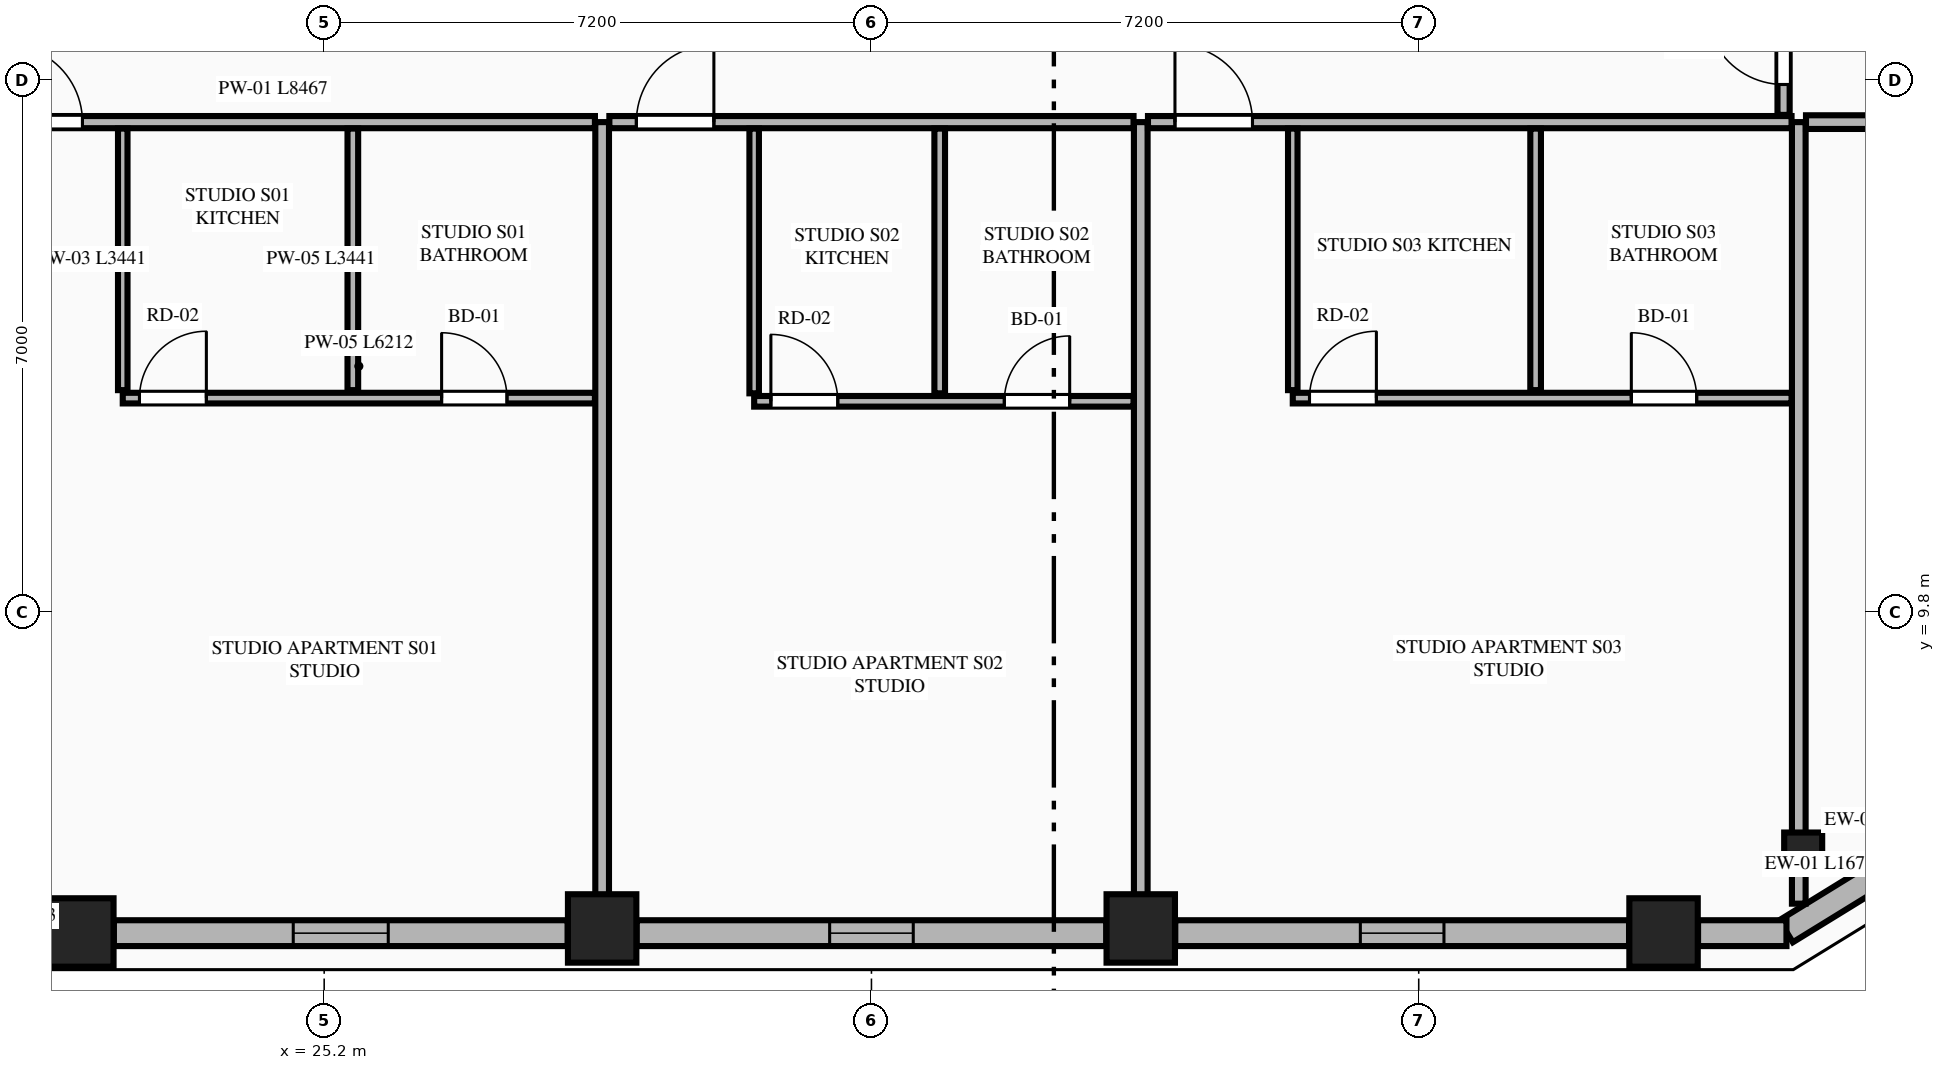
"""IFC4 building model, lengths in metres.
Left out: names, types, materials, properties, quantities, classifications, styles, units other than length and angle.
Written with IfcOpenShell. Run it as: python <this file> out.ifc"""

import sys

from ifc_helpers import new_model, si_unit, direction, frame, frame_2d, origin, origin_2d, place, context, subcontext, project, spatial, rectangle, extrude, element, fill, save


model = new_model("IFC4")
c1 = context("Model", 3, precision=1e-05, world=origin(), true_north=direction((0.0, 1.0)))
c2 = subcontext(c1, "Body", "Model", "MODEL_VIEW")
j1 = project(units=[si_unit("LENGTHUNIT", "METRE"), si_unit("PLANEANGLEUNIT", "RADIAN")], contexts=[c1])
p1 = place(None, origin())
s1 = spatial("IfcSite", under=j1, at=p1, CompositionType="ELEMENT")
p2 = place(p1, origin())
s2 = spatial("IfcBuilding", under=s1, at=p2, CompositionType="ELEMENT")
p3 = place(p2, frame((0.0, 0.0, 189.65)))
s3 = spatial("IfcBuildingStorey", under=s2, at=p3, CompositionType="ELEMENT", Elevation=189.65)
for number, where, z_axis, x_axis in (
    (1, (21.979, 5.589, 0.0), (0.0, 0.0, 1.0), (1.0, 0.0, 0.0)),
    (2, (28.857, 5.642, 0.0), (0.0, 0.0, 1.0), (1.0, 0.0, 0.0)),
    (3, (35.943, 5.642, 0.0), (0.0, 0.0, 1.0), (1.0, 0.0, 0.0)),
    (4, (42.821, 5.589, 0.0), (0.0, 0.0, 1.0), (1.0, 0.0, 0.0)),
):
    element("IfcColumn", number, at=place(p3, frame(where, z_axis=z_axis, x_axis=x_axis)), inside=s3, PredefinedType="COLUMN", context=c2, shape_type="SweptSolid", body=[
        extrude(rectangle(XDim=0.9, YDim=0.9, at=origin_2d()), origin(), (0.0, 0.0, 1.0), 3.55),
    ])
p4 = place(p3, frame((44.658, 6.654, 0.0), z_axis=(0.0, 0.0, 1.0), x_axis=(0.865230187018, 0.501374833306, 0.0)))
e5 = element("IfcColumn", 5, at=p4, inside=s3, PredefinedType="PILASTER", context=c2, shape_type="SweptSolid", body=[
    extrude(rectangle(XDim=0.5, YDim=0.35, at=origin_2d()), origin(), (0.0, 0.0, 1.0), 3.55),
])
p5 = place(p3, frame((44.433, 5.605, 0.0), z_axis=(0.0, 0.0, 1.0), x_axis=(0.851778214877, 0.523902541185, 0.0)))
e6 = element("IfcWall", 6, at=p5, inside=s3, PredefinedType="STANDARD", context=c2, shape_type="SweptSolid", body=[
    extrude(rectangle(XDim=1.678, YDim=0.34, at=frame_2d((0.839, 0.0))), origin(), (0.0, 0.0, 1.0), 3.35),
])
p6 = place(p3, frame((22.433, 5.58, 0.0), z_axis=(0.0, 0.0, 1.0), x_axis=(1.0, 0.0, 0.0)))
e7 = element("IfcWall", 7, at=p6, inside=s3, PredefinedType="STANDARD", context=c2, shape_type="SweptSolid", body=[
    extrude(rectangle(XDim=5.97, YDim=0.34, at=frame_2d((2.985, 0.0))), origin(), (0.0, 0.0, 1.0), 2.883),
])
p7 = place(p6, frame((2.36, 0.0, 0.75)))
e8 = element("IfcOpeningElement", 8, at=p7, cuts=e7, PredefinedType="OPENING", context=c2, shape_type="SweptSolid", body=[
    extrude(rectangle(XDim=1.25, YDim=1.95, at=frame_2d((0.625, 0.975))), frame((0.0, 0.18, 0.0), z_axis=(0.0, -1.0, 0.0), x_axis=(1.0, 0.0, 0.0)), (0.0, 0.0, 1.0), 0.36),
])
p8 = place(p3, frame((29.311, 5.58, 0.0), z_axis=(0.0, 0.0, 1.0), x_axis=(1.0, 0.0, 0.0)))
e9 = element("IfcWall", 9, at=p8, inside=s3, PredefinedType="STANDARD", context=c2, shape_type="SweptSolid", body=[
    extrude(rectangle(XDim=6.178, YDim=0.34, at=frame_2d((3.089, 0.0))), origin(), (0.0, 0.0, 1.0), 2.883),
])
p9 = place(p8, frame((2.539, 0.0, 0.75)))
e10 = element("IfcOpeningElement", 10, at=p9, cuts=e9, PredefinedType="OPENING", context=c2, shape_type="SweptSolid", body=[
    extrude(rectangle(XDim=1.1, YDim=1.983, at=frame_2d((0.55, 0.991))), frame((0.0, 0.18, 0.0), z_axis=(0.0, -1.0, 0.0), x_axis=(1.0, 0.0, 0.0)), (0.0, 0.0, 1.0), 0.36),
])
p10 = place(p3, frame((36.397, 5.58, 0.0), z_axis=(0.0, 0.0, 1.0), x_axis=(1.0, 0.0, 0.0)))
e11 = element("IfcWall", 11, at=p10, inside=s3, PredefinedType="STANDARD", context=c2, shape_type="SweptSolid", body=[
    extrude(rectangle(XDim=5.97, YDim=0.34, at=frame_2d((2.985, 0.0))), origin(), (0.0, 0.0, 1.0), 2.883),
])
p11 = place(p10, frame((2.435, 0.0, 0.75)))
e12 = element("IfcOpeningElement", 12, at=p11, cuts=e11, PredefinedType="OPENING", context=c2, shape_type="SweptSolid", body=[
    extrude(rectangle(XDim=1.1, YDim=1.983, at=frame_2d((0.55, 0.991))), frame((0.0, 0.18, 0.0), z_axis=(0.0, -1.0, 0.0), x_axis=(1.0, 0.0, 0.0)), (0.0, 0.0, 1.0), 0.36),
])
p12 = place(p3, frame((43.275, 5.58, 0.0), z_axis=(0.0, 0.0, 1.0), x_axis=(1.0, 0.0, 0.0)))
e13 = element("IfcWall", 13, at=p12, inside=s3, PredefinedType="STANDARD", context=c2, shape_type="SweptSolid", body=[
    extrude(rectangle(XDim=1.163, YDim=0.34, at=frame_2d((0.582, 0.0))), origin(), (0.0, 0.0, 1.0), 3.35),
])
for number, where, z_axis, x_axis in (
    (14, (28.857, 5.755, 0.0), (0.0, 0.0, 1.0), (0.0, 1.0, 0.0)),
    (15, (35.943, 5.755, 0.0), (0.0, 0.0, 1.0), (0.0, 1.0, 0.0)),
):
    element("IfcWall", number, at=place(p3, frame(where, z_axis=z_axis, x_axis=x_axis)), inside=s3, PredefinedType="PARTITIONING", context=c2, shape_type="SweptSolid", body=[
        extrude(rectangle(XDim=10.495, YDim=0.18, at=frame_2d((5.248, 0.0))), origin(), (0.0, 0.0, 1.0), 2.807),
    ])
p13 = place(p3, frame((44.6, 5.968, 0.0), z_axis=(0.0, 0.0, 1.0), x_axis=(0.0, 1.0, 0.0)))
e16 = element("IfcWall", 16, at=p13, inside=s3, PredefinedType="PARTITIONING", context=c2, shape_type="SweptSolid", body=[
    extrude(rectangle(XDim=10.282, YDim=0.18, at=frame_2d((5.141, 0.0))), origin(), (0.0, 0.0, 1.0), 3.35),
])
p14 = place(p3, frame((20.295, 16.25, 0.0), z_axis=(0.0, 0.0, 1.0), x_axis=(1.0, 0.0, 0.0)))
e17 = element("IfcWall", 17, at=p14, inside=s3, PredefinedType="PARTITIONING", context=c2, shape_type="SweptSolid", body=[
    extrude(rectangle(XDim=8.467, YDim=0.16, at=frame_2d((4.233, 0.0))), origin(), (0.0, 0.0, 1.0), 3.35),
])
p15 = place(p14, frame((0.705, 0.0, 0.0)))
e18 = element("IfcOpeningElement", 18, at=p15, cuts=e17, PredefinedType="OPENING", context=c2, shape_type="SweptSolid", body=[
    extrude(rectangle(XDim=1.02, YDim=2.25, at=frame_2d((0.51, 1.125))), frame((0.0, 0.09, 0.0), z_axis=(0.0, -1.0, 0.0), x_axis=(1.0, 0.0, 0.0)), (0.0, 0.0, 1.0), 0.18),
])
p16 = place(p3, frame((22.55, 12.724, 0.0), z_axis=(0.0, 0.0, 1.0), x_axis=(0.0, 1.0, 0.0)))
e19 = element("IfcWall", 19, at=p16, inside=s3, PredefinedType="PARTITIONING", context=c2, shape_type="SweptSolid", body=[
    extrude(rectangle(XDim=3.441, YDim=0.125, at=frame_2d((1.72, 0.0))), origin(), (0.0, 0.0, 1.0), 2.807),
])
p17 = place(p3, frame((22.55, 12.619, 0.0), z_axis=(0.0, 0.0, 1.0), x_axis=(1.0, 0.0, 0.0)))
e20 = element("IfcWall", 20, at=p17, inside=s3, PredefinedType="PLUMBINGWALL", context=c2, shape_type="SweptSolid", body=[
    extrude(rectangle(XDim=6.212, YDim=0.14, at=frame_2d((3.106, 0.0))), origin(), (0.0, 0.0, 1.0), 3.35),
])
p18 = place(p17, frame((4.195, 0.0, 0.0)))
e21 = element("IfcOpeningElement", 21, at=p18, cuts=e20, PredefinedType="OPENING", context=c2, shape_type="SweptSolid", body=[
    extrude(rectangle(XDim=0.86, YDim=2.1, at=frame_2d((0.43, 1.05))), frame((0.0, 0.08, 0.0), z_axis=(0.0, -1.0, 0.0), x_axis=(1.0, 0.0, 0.0)), (0.0, 0.0, 1.0), 0.16),
])
p19 = place(p17, frame((0.22, 0.0, 0.0)))
e22 = element("IfcOpeningElement", 22, at=p19, cuts=e20, PredefinedType="OPENING", context=c2, shape_type="SweptSolid", body=[
    extrude(rectangle(XDim=0.88, YDim=2.15, at=frame_2d((0.44, 1.075))), frame((0.0, 0.08, 0.0), z_axis=(0.0, -1.0, 0.0), x_axis=(1.0, 0.0, 0.0)), (0.0, 0.0, 1.0), 0.16),
])
p20 = place(p3, frame((25.577, 12.724, 0.0), z_axis=(0.0, 0.0, 1.0), x_axis=(0.0, 1.0, 0.0)))
e23 = element("IfcWall", 23, at=p20, inside=s3, PredefinedType="PLUMBINGWALL", context=c2, shape_type="SweptSolid", body=[
    extrude(rectangle(XDim=3.441, YDim=0.14, at=frame_2d((1.72, 0.0))), origin(), (0.0, 0.0, 1.0), 3.35),
])
p21 = place(p3, frame((28.952, 16.25, 0.0), z_axis=(0.0, 0.0, 1.0), x_axis=(1.0, 0.0, 0.0)))
e24 = element("IfcWall", 24, at=p21, inside=s3, PredefinedType="PARTITIONING", context=c2, shape_type="SweptSolid", body=[
    extrude(rectangle(XDim=6.896, YDim=0.16, at=frame_2d((3.448, 0.0))), origin(), (0.0, 0.0, 1.0), 3.35),
])
p22 = place(p21, frame((0.355, 0.0, 0.0)))
e25 = element("IfcOpeningElement", 25, at=p22, cuts=e24, PredefinedType="OPENING", context=c2, shape_type="SweptSolid", body=[
    extrude(rectangle(XDim=1.02, YDim=2.25, at=frame_2d((0.51, 1.125))), frame((0.0, 0.09, 0.0), z_axis=(0.0, -1.0, 0.0), x_axis=(1.0, 0.0, 0.0)), (0.0, 0.0, 1.0), 0.18),
])
p23 = place(p3, frame((30.857, 12.682, 0.0), z_axis=(0.0, 0.0, 1.0), x_axis=(0.0, 1.0, 0.0)))
e26 = element("IfcWall", 26, at=p23, inside=s3, PredefinedType="PARTITIONING", context=c2, shape_type="SweptSolid", body=[
    extrude(rectangle(XDim=3.483, YDim=0.125, at=frame_2d((1.742, 0.0))), origin(), (0.0, 0.0, 1.0), 3.35),
])
p24 = place(p3, frame((30.857, 12.577, 0.0), z_axis=(0.0, 0.0, 1.0), x_axis=(1.0, 0.0, 0.0)))
e27 = element("IfcWall", 27, at=p24, inside=s3, PredefinedType="PLUMBINGWALL", context=c2, shape_type="SweptSolid", body=[
    extrude(rectangle(XDim=4.991, YDim=0.14, at=frame_2d((2.496, 0.0))), origin(), (0.0, 0.0, 1.0), 3.35),
])
p25 = place(p24, frame((3.291, 0.0, 0.0)))
e28 = element("IfcOpeningElement", 28, at=p25, cuts=e27, PredefinedType="OPENING", context=c2, shape_type="SweptSolid", body=[
    extrude(rectangle(XDim=0.86, YDim=2.1, at=frame_2d((0.43, 1.05))), frame((0.0, 0.08, 0.0), z_axis=(0.0, -1.0, 0.0), x_axis=(1.0, 0.0, 0.0)), (0.0, 0.0, 1.0), 0.16),
])
p26 = place(p24, frame((0.22, 0.0, 0.0)))
e29 = element("IfcOpeningElement", 29, at=p26, cuts=e27, PredefinedType="OPENING", context=c2, shape_type="SweptSolid", body=[
    extrude(rectangle(XDim=0.88, YDim=2.15, at=frame_2d((0.44, 1.075))), frame((0.0, 0.08, 0.0), z_axis=(0.0, -1.0, 0.0), x_axis=(1.0, 0.0, 0.0)), (0.0, 0.0, 1.0), 0.16),
])
p27 = place(p3, frame((33.298, 12.682, 0.0), z_axis=(0.0, 0.0, 1.0), x_axis=(0.0, 1.0, 0.0)))
e30 = element("IfcWall", 30, at=p27, inside=s3, PredefinedType="PLUMBINGWALL", context=c2, shape_type="SweptSolid", body=[
    extrude(rectangle(XDim=3.483, YDim=0.14, at=frame_2d((1.742, 0.0))), origin(), (0.0, 0.0, 1.0), 3.35),
])
p28 = place(p3, frame((36.038, 16.25, 0.0), z_axis=(0.0, 0.0, 1.0), x_axis=(1.0, 0.0, 0.0)))
e31 = element("IfcWall", 31, at=p28, inside=s3, PredefinedType="PARTITIONING", context=c2, shape_type="SweptSolid", body=[
    extrude(rectangle(XDim=8.467, YDim=0.16, at=frame_2d((4.233, 0.0))), origin(), (0.0, 0.0, 1.0), 3.35),
])
p29 = place(p28, frame((0.355, 0.0, 0.0)))
e32 = element("IfcOpeningElement", 32, at=p29, cuts=e31, PredefinedType="OPENING", context=c2, shape_type="SweptSolid", body=[
    extrude(rectangle(XDim=1.02, YDim=2.25, at=frame_2d((0.51, 1.125))), frame((0.0, 0.09, 0.0), z_axis=(0.0, -1.0, 0.0), x_axis=(1.0, 0.0, 0.0)), (0.0, 0.0, 1.0), 0.18),
])
p30 = place(p3, frame((37.943, 12.724, 0.0), z_axis=(0.0, 0.0, 1.0), x_axis=(0.0, 1.0, 0.0)))
e33 = element("IfcWall", 33, at=p30, inside=s3, PredefinedType="PARTITIONING", context=c2, shape_type="SweptSolid", body=[
    extrude(rectangle(XDim=3.441, YDim=0.125, at=frame_2d((1.72, 0.0))), origin(), (0.0, 0.0, 1.0), 3.35),
])
p31 = place(p3, frame((37.943, 12.619, 0.0), z_axis=(0.0, 0.0, 1.0), x_axis=(1.0, 0.0, 0.0)))
e34 = element("IfcWall", 34, at=p31, inside=s3, PredefinedType="PLUMBINGWALL", context=c2, shape_type="SweptSolid", body=[
    extrude(rectangle(XDim=6.562, YDim=0.14, at=frame_2d((3.281, 0.0))), origin(), (0.0, 0.0, 1.0), 3.35),
])
p32 = place(p31, frame((4.454, 0.0, 0.0)))
e35 = element("IfcOpeningElement", 35, at=p32, cuts=e34, PredefinedType="OPENING", context=c2, shape_type="SweptSolid", body=[
    extrude(rectangle(XDim=0.86, YDim=2.1, at=frame_2d((0.43, 1.05))), frame((0.0, 0.08, 0.0), z_axis=(0.0, -1.0, 0.0), x_axis=(1.0, 0.0, 0.0)), (0.0, 0.0, 1.0), 0.16),
])
p33 = place(p31, frame((0.22, 0.0, 0.0)))
e36 = element("IfcOpeningElement", 36, at=p33, cuts=e34, PredefinedType="OPENING", context=c2, shape_type="SweptSolid", body=[
    extrude(rectangle(XDim=0.88, YDim=2.15, at=frame_2d((0.44, 1.075))), frame((0.0, 0.08, 0.0), z_axis=(0.0, -1.0, 0.0), x_axis=(1.0, 0.0, 0.0)), (0.0, 0.0, 1.0), 0.16),
])
p34 = place(p3, frame((41.138, 12.724, 0.0), z_axis=(0.0, 0.0, 1.0), x_axis=(0.0, 1.0, 0.0)))
e37 = element("IfcWall", 37, at=p34, inside=s3, PredefinedType="PLUMBINGWALL", context=c2, shape_type="SweptSolid", body=[
    extrude(rectangle(XDim=3.441, YDim=0.14, at=frame_2d((1.72, 0.0))), origin(), (0.0, 0.0, 1.0), 3.35),
])
p35 = place(p3, frame((44.695, 16.25, 0.0), z_axis=(0.0, 0.0, 1.0), x_axis=(1.0, 0.0, 0.0)))
e38 = element("IfcWall", 38, at=p35, inside=s3, PredefinedType="PARTITIONING", context=c2, shape_type="SweptSolid", body=[
    extrude(rectangle(XDim=5.894, YDim=0.18, at=frame_2d((2.947, 0.0))), origin(), (0.0, 0.0, 1.0), 3.35),
])
p36 = place(p3, frame((44.4, 16.345, 0.0), z_axis=(0.0, 0.0, 1.0), x_axis=(0.0, 1.0, 0.0)))
e39 = element("IfcWall", 39, at=p36, inside=s3, PredefinedType="PARTITIONING", context=c2, shape_type="SweptSolid", body=[
    extrude(rectangle(XDim=6.236, YDim=0.16, at=frame_2d((3.118, 0.0))), origin(), (0.0, 0.0, 1.0), 3.35),
])
p37 = place(p36, frame((0.4, 0.0, 0.0)))
e40 = element("IfcOpeningElement", 40, at=p37, cuts=e39, PredefinedType="OPENING", context=c2, shape_type="SweptSolid", body=[
    extrude(rectangle(XDim=1.02, YDim=2.25, at=frame_2d((0.51, 1.125))), frame((0.0, 0.09, 0.0), z_axis=(0.0, -1.0, 0.0), x_axis=(1.0, 0.0, 0.0)), (0.0, 0.0, 1.0), 0.18),
])
p38 = place(p7, origin())
e41 = element("IfcWindow", 41, at=p38, inside=s3, PartitioningType="SINGLE_PANEL", PredefinedType="WINDOW", context=c2, shape_type="SweptSolid", body=[
    extrude(rectangle(XDim=1.25, YDim=1.95, at=frame_2d((0.625, 0.975))), frame((0.0, 0.03, 0.0), z_axis=(0.0, -1.0, 0.0), x_axis=(1.0, 0.0, 0.0)), (0.0, 0.0, 1.0), 0.06),
])
fill(e8, e41)
p39 = place(p9, origin())
e42 = element("IfcWindow", 42, at=p39, inside=s3, PartitioningType="SINGLE_PANEL", PredefinedType="WINDOW", context=c2, shape_type="SweptSolid", body=[
    extrude(rectangle(XDim=1.1, YDim=1.983, at=frame_2d((0.55, 0.991))), frame((0.0, 0.03, 0.0), z_axis=(0.0, -1.0, 0.0), x_axis=(1.0, 0.0, 0.0)), (0.0, 0.0, 1.0), 0.06),
])
fill(e10, e42)
p40 = place(p11, origin())
e43 = element("IfcWindow", 43, at=p40, inside=s3, PartitioningType="SINGLE_PANEL", PredefinedType="WINDOW", context=c2, shape_type="SweptSolid", body=[
    extrude(rectangle(XDim=1.1, YDim=1.983, at=frame_2d((0.55, 0.991))), frame((0.0, 0.03, 0.0), z_axis=(0.0, -1.0, 0.0), x_axis=(1.0, 0.0, 0.0)), (0.0, 0.0, 1.0), 0.06),
])
fill(e12, e43)
p41 = place(p18, origin())
e44 = element("IfcDoor", 44, at=p41, inside=s3, OperationType="SINGLE_SWING_LEFT", PredefinedType="DOOR", context=c2, shape_type="SweptSolid", body=[
    extrude(rectangle(XDim=0.86, YDim=2.1, at=frame_2d((0.43, 1.05))), frame((0.0, 0.025, 0.0), z_axis=(0.0, -1.0, 0.0), x_axis=(1.0, 0.0, 0.0)), (0.0, 0.0, 1.0), 0.05),
])
fill(e21, e44)
p42 = place(p15, origin())
e45 = element("IfcDoor", 45, at=p42, inside=s3, OperationType="SINGLE_SWING_LEFT", PredefinedType="DOOR", context=c2, shape_type="SweptSolid", body=[
    extrude(rectangle(XDim=1.02, YDim=2.25, at=frame_2d((0.51, 1.125))), frame((0.0, 0.025, 0.0), z_axis=(0.0, -1.0, 0.0), x_axis=(1.0, 0.0, 0.0)), (0.0, 0.0, 1.0), 0.05),
])
fill(e18, e45)
p43 = place(p19, origin())
e46 = element("IfcDoor", 46, at=p43, inside=s3, OperationType="SINGLE_SWING_RIGHT", PredefinedType="DOOR", context=c2, shape_type="SweptSolid", body=[
    extrude(rectangle(XDim=0.88, YDim=2.15, at=frame_2d((0.44, 1.075))), frame((0.0, 0.025, 0.0), z_axis=(0.0, -1.0, 0.0), x_axis=(1.0, 0.0, 0.0)), (0.0, 0.0, 1.0), 0.05),
])
fill(e22, e46)
p44 = place(p25, origin())
e47 = element("IfcDoor", 47, at=p44, inside=s3, OperationType="SINGLE_SWING_RIGHT", PredefinedType="DOOR", context=c2, shape_type="SweptSolid", body=[
    extrude(rectangle(XDim=0.86, YDim=2.1, at=frame_2d((0.43, 1.05))), frame((0.0, 0.025, 0.0), z_axis=(0.0, -1.0, 0.0), x_axis=(1.0, 0.0, 0.0)), (0.0, 0.0, 1.0), 0.05),
])
fill(e28, e47)
p45 = place(p22, origin())
e48 = element("IfcDoor", 48, at=p45, inside=s3, OperationType="SINGLE_SWING_RIGHT", PredefinedType="DOOR", context=c2, shape_type="SweptSolid", body=[
    extrude(rectangle(XDim=1.02, YDim=2.25, at=frame_2d((0.51, 1.125))), frame((0.0, 0.025, 0.0), z_axis=(0.0, -1.0, 0.0), x_axis=(1.0, 0.0, 0.0)), (0.0, 0.0, 1.0), 0.05),
])
fill(e25, e48)
p46 = place(p26, origin())
e49 = element("IfcDoor", 49, at=p46, inside=s3, OperationType="SINGLE_SWING_LEFT", PredefinedType="DOOR", context=c2, shape_type="SweptSolid", body=[
    extrude(rectangle(XDim=0.88, YDim=2.15, at=frame_2d((0.44, 1.075))), frame((0.0, 0.025, 0.0), z_axis=(0.0, -1.0, 0.0), x_axis=(1.0, 0.0, 0.0)), (0.0, 0.0, 1.0), 0.05),
])
fill(e29, e49)
p47 = place(p32, origin())
e50 = element("IfcDoor", 50, at=p47, inside=s3, OperationType="SINGLE_SWING_LEFT", PredefinedType="DOOR", context=c2, shape_type="SweptSolid", body=[
    extrude(rectangle(XDim=0.86, YDim=2.1, at=frame_2d((0.43, 1.05))), frame((0.0, 0.025, 0.0), z_axis=(0.0, -1.0, 0.0), x_axis=(1.0, 0.0, 0.0)), (0.0, 0.0, 1.0), 0.05),
])
fill(e35, e50)
p48 = place(p29, origin())
e51 = element("IfcDoor", 51, at=p48, inside=s3, OperationType="SINGLE_SWING_LEFT", PredefinedType="DOOR", context=c2, shape_type="SweptSolid", body=[
    extrude(rectangle(XDim=1.02, YDim=2.25, at=frame_2d((0.51, 1.125))), frame((0.0, 0.025, 0.0), z_axis=(0.0, -1.0, 0.0), x_axis=(1.0, 0.0, 0.0)), (0.0, 0.0, 1.0), 0.05),
])
fill(e32, e51)
p49 = place(p33, origin())
e52 = element("IfcDoor", 52, at=p49, inside=s3, OperationType="SINGLE_SWING_RIGHT", PredefinedType="DOOR", context=c2, shape_type="SweptSolid", body=[
    extrude(rectangle(XDim=0.88, YDim=2.15, at=frame_2d((0.44, 1.075))), frame((0.0, 0.025, 0.0), z_axis=(0.0, -1.0, 0.0), x_axis=(1.0, 0.0, 0.0)), (0.0, 0.0, 1.0), 0.05),
])
fill(e36, e52)
p50 = place(p37, origin())
e53 = element("IfcDoor", 53, at=p50, inside=s3, OperationType="SINGLE_SWING_RIGHT", PredefinedType="DOOR", context=c2, shape_type="SweptSolid", body=[
    extrude(rectangle(XDim=1.02, YDim=2.25, at=frame_2d((0.51, 1.125))), frame((0.0, 0.025, 0.0), z_axis=(0.0, -1.0, 0.0), x_axis=(1.0, 0.0, 0.0)), (0.0, 0.0, 1.0), 0.05),
])
fill(e40, e53)
save(model, sys.argv[1])
